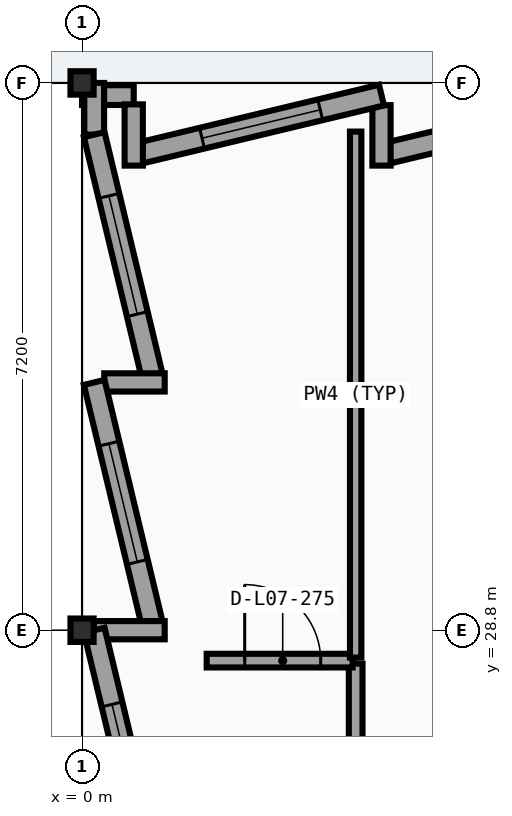
"""IFC4 building model, lengths in metres.
Left out: names, types, materials, properties, quantities, classifications, styles, units other than length and angle.
Written with IfcOpenShell. Run it as: python <this file> out.ifc"""

import sys

from ifc_helpers import new_model, si_unit, direction, frame, frame_2d, origin, origin_2d, place, context, subcontext, project, spatial, rectangle, i_section, extrude, element, fill, save


model = new_model("IFC4")
c1 = context("Model", 3, precision=1e-05, world=origin(), true_north=direction((0.0, 1.0)))
c2 = subcontext(c1, "Body", "Model", "MODEL_VIEW")
j1 = project(units=[si_unit("LENGTHUNIT", "METRE"), si_unit("PLANEANGLEUNIT", "RADIAN")], contexts=[c1])
p1 = place(None, origin())
s1 = spatial("IfcSite", under=j1, at=p1, CompositionType="ELEMENT")
p2 = place(p1, origin())
s2 = spatial("IfcBuilding", under=s1, at=p2, CompositionType="ELEMENT")
p3 = place(p2, frame((0.0, 0.0, 31.05)))
s3 = spatial("IfcBuildingStorey", under=s2, at=p3, CompositionType="ELEMENT", Elevation=31.05)
for number, where, z_axis, x_axis in (
    (1, (0.0, 28.8, 0.0), (0.0, 0.0, 1.0), (1.0, 0.0, 0.0)),
    (2, (0.0, 36.0, 0.0), (0.0, 0.0, 1.0), (1.0, 0.0, 0.0)),
):
    element("IfcColumn", number, at=place(p3, frame(where, z_axis=z_axis, x_axis=x_axis)), inside=s3, PredefinedType="COLUMN", context=c2, shape_type="SweptSolid", body=[
        extrude(i_section(OverallWidth=0.305, OverallDepth=0.308, WebThickness=0.01, FlangeThickness=0.015, FilletRadius=0.015, at=origin_2d()), origin(), (0.0, 0.0, 1.0), 4.2),
    ])
p4 = place(p3, frame((0.68, 35.84, 0.0), z_axis=(0.0, 0.0, 1.0), x_axis=(-1.0, 0.0, 0.0)))
e3 = element("IfcWall", 3, at=p4, inside=s3, PredefinedType="SOLIDWALL", context=c2, shape_type="SweptSolid", body=[
    extrude(rectangle(XDim=0.68, YDim=0.26, at=frame_2d((0.34, 0.0))), origin(), (0.0, 0.0, 1.0), 3.95),
])
p5 = place(p3, frame((7.2, 35.84, 0.0), z_axis=(0.0, 0.0, 1.0), x_axis=(-0.972366208453, -0.233460824675, 0.0)))
e4 = element("IfcWall", 4, at=p5, inside=s3, PredefinedType="SOLIDWALL", context=c2, shape_type="SweptSolid", body=[
    extrude(rectangle(XDim=3.258, YDim=0.28, at=frame_2d((1.629, 0.0))), origin(), (0.0, 0.0, 1.0), 3.95),
])
p6 = place(p5, frame((0.829, 0.0, 0.8)))
e5 = element("IfcOpeningElement", 5, at=p6, cuts=e4, PredefinedType="OPENING", context=c2, shape_type="SweptSolid", body=[
    extrude(rectangle(XDim=1.6, YDim=1.75, at=frame_2d((0.8, 0.875))), frame((0.0, 0.15, 0.0), z_axis=(0.0, -1.0, 0.0), x_axis=(1.0, 0.0, 0.0)), (0.0, 0.0, 1.0), 0.3),
])
p7 = place(p3, frame((3.94, 34.912, 0.0), z_axis=(0.0, 0.0, 1.0), x_axis=(0.0, 1.0, 0.0)))
e6 = element("IfcWall", 6, at=p7, inside=s3, PredefinedType="SOLIDWALL", context=c2, shape_type="SweptSolid", body=[
    extrude(rectangle(XDim=0.796, YDim=0.24, at=frame_2d((0.398, 0.0))), origin(), (0.0, 0.0, 1.0), 3.95),
])
p8 = place(p3, frame((3.94, 35.84, 0.0), z_axis=(0.0, 0.0, 1.0), x_axis=(-0.972366208453, -0.233460824675, 0.0)))
e7 = element("IfcWall", 7, at=p8, inside=s3, PredefinedType="SOLIDWALL", context=c2, shape_type="SweptSolid", body=[
    extrude(rectangle(XDim=3.258, YDim=0.28, at=frame_2d((1.629, 0.0))), origin(), (0.0, 0.0, 1.0), 3.95),
])
p9 = place(p8, frame((0.829, 0.0, 0.8)))
e8 = element("IfcOpeningElement", 8, at=p9, cuts=e7, PredefinedType="OPENING", context=c2, shape_type="SweptSolid", body=[
    extrude(rectangle(XDim=1.6, YDim=1.75, at=frame_2d((0.8, 0.875))), frame((0.0, 0.15, 0.0), z_axis=(0.0, -1.0, 0.0), x_axis=(1.0, 0.0, 0.0)), (0.0, 0.0, 1.0), 0.3),
])
p10 = place(p3, frame((0.68, 34.912, 0.0), z_axis=(0.0, 0.0, 1.0), x_axis=(0.0, 1.0, 0.0)))
e9 = element("IfcWall", 9, at=p10, inside=s3, PredefinedType="SOLIDWALL", context=c2, shape_type="SweptSolid", body=[
    extrude(rectangle(XDim=0.806, YDim=0.24, at=frame_2d((0.403, 0.0))), origin(), (0.0, 0.0, 1.0), 3.95),
])
p11 = place(p3, frame((0.16, 36.0, 0.0), z_axis=(0.0, 0.0, 1.0), x_axis=(0.0, -1.0, 0.0)))
e10 = element("IfcWall", 10, at=p11, inside=s3, PredefinedType="SOLIDWALL", context=c2, shape_type="SweptSolid", body=[
    extrude(rectangle(XDim=0.68, YDim=0.26, at=frame_2d((0.34, 0.0))), origin(), (0.0, 0.0, 1.0), 3.95),
])
p12 = place(p3, frame((0.16, 35.32, 0.0), z_axis=(0.0, 0.0, 1.0), x_axis=(0.233443812137, -0.972370292931, 0.0)))
e11 = element("IfcWall", 11, at=p12, inside=s3, PredefinedType="SOLIDWALL", context=c2, shape_type="SweptSolid", body=[
    extrude(rectangle(XDim=3.258, YDim=0.28, at=frame_2d((1.629, 0.0))), origin(), (0.0, 0.0, 1.0), 3.95),
])
p13 = place(p12, frame((0.829, 0.0, 0.8)))
e12 = element("IfcOpeningElement", 12, at=p13, cuts=e11, PredefinedType="OPENING", context=c2, shape_type="SweptSolid", body=[
    extrude(rectangle(XDim=1.6, YDim=1.75, at=frame_2d((0.8, 0.875))), frame((0.0, 0.15, 0.0), z_axis=(0.0, -1.0, 0.0), x_axis=(1.0, 0.0, 0.0)), (0.0, 0.0, 1.0), 0.3),
])
p14 = place(p3, frame((1.088, 32.06, 0.0), z_axis=(0.0, 0.0, 1.0), x_axis=(-1.0, 0.0, 0.0)))
e13 = element("IfcWall", 13, at=p14, inside=s3, PredefinedType="SOLIDWALL", context=c2, shape_type="SweptSolid", body=[
    extrude(rectangle(XDim=0.796, YDim=0.24, at=frame_2d((0.398, 0.0))), origin(), (0.0, 0.0, 1.0), 3.95),
])
p15 = place(p3, frame((0.16, 32.06, 0.0), z_axis=(0.0, 0.0, 1.0), x_axis=(0.233443812137, -0.972370292931, 0.0)))
e14 = element("IfcWall", 14, at=p15, inside=s3, PredefinedType="SOLIDWALL", context=c2, shape_type="SweptSolid", body=[
    extrude(rectangle(XDim=3.258, YDim=0.28, at=frame_2d((1.629, 0.0))), origin(), (0.0, 0.0, 1.0), 3.95),
])
p16 = place(p15, frame((0.829, 0.0, 0.8)))
e15 = element("IfcOpeningElement", 15, at=p16, cuts=e14, PredefinedType="OPENING", context=c2, shape_type="SweptSolid", body=[
    extrude(rectangle(XDim=1.6, YDim=1.75, at=frame_2d((0.8, 0.875))), frame((0.0, 0.15, 0.0), z_axis=(0.0, -1.0, 0.0), x_axis=(1.0, 0.0, 0.0)), (0.0, 0.0, 1.0), 0.3),
])
p17 = place(p3, frame((1.088, 28.8, 0.0), z_axis=(0.0, 0.0, 1.0), x_axis=(-1.0, 0.0, 0.0)))
e16 = element("IfcWall", 16, at=p17, inside=s3, PredefinedType="SOLIDWALL", context=c2, shape_type="SweptSolid", body=[
    extrude(rectangle(XDim=0.933, YDim=0.24, at=frame_2d((0.467, 0.0))), origin(), (0.0, 0.0, 1.0), 3.95),
])
p18 = place(p3, frame((0.16, 28.8, 0.0), z_axis=(0.0, 0.0, 1.0), x_axis=(0.233495818898, -0.972357805829, 0.0)))
e17 = element("IfcWall", 17, at=p18, inside=s3, PredefinedType="SOLIDWALL", context=c2, shape_type="SweptSolid", body=[
    extrude(rectangle(XDim=3.607, YDim=0.28, at=frame_2d((1.804, 0.0))), origin(), (0.0, 0.0, 1.0), 3.95),
])
p19 = place(p18, frame((1.004, 0.0, 0.8)))
e18 = element("IfcOpeningElement", 18, at=p19, cuts=e17, PredefinedType="OPENING", context=c2, shape_type="SweptSolid", body=[
    extrude(rectangle(XDim=1.6, YDim=1.75, at=frame_2d((0.8, 0.875))), frame((0.0, 0.15, 0.0), z_axis=(0.0, -1.0, 0.0), x_axis=(1.0, 0.0, 0.0)), (0.0, 0.0, 1.0), 0.3),
])
p20 = place(p3, frame((3.6, 24.44, 0.0), z_axis=(0.0, 0.0, 1.0), x_axis=(0.0, 1.0, 0.0)))
e19 = element("IfcWall", 19, at=p20, inside=s3, PredefinedType="PARTITIONING", context=c2, shape_type="SweptSolid", body=[
    extrude(rectangle(XDim=3.92, YDim=0.18, at=frame_2d((1.96, 0.0))), origin(), (0.0, 0.0, 1.0), 3.95),
])
p21 = place(p3, frame((1.64, 28.4, 0.0), z_axis=(0.0, 0.0, 1.0), x_axis=(1.0, 0.0, 0.0)))
e20 = element("IfcWall", 20, at=p21, inside=s3, PredefinedType="PARTITIONING", context=c2, shape_type="SweptSolid", body=[
    extrude(rectangle(XDim=1.92, YDim=0.18, at=frame_2d((0.96, 0.0))), origin(), (0.0, 0.0, 1.0), 3.95),
])
p22 = place(p21, frame((0.5, 0.0, 0.0)))
e21 = element("IfcOpeningElement", 21, at=p22, cuts=e20, PredefinedType="OPENING", context=c2, shape_type="SweptSolid", body=[
    extrude(rectangle(XDim=1.0, YDim=2.1, at=frame_2d((0.5, 1.05))), frame((0.0, 0.1, 0.0), z_axis=(0.0, -1.0, 0.0), x_axis=(1.0, 0.0, 0.0)), (0.0, 0.0, 1.0), 0.2),
])
p23 = place(p3, frame((3.6, 28.44, 0.0), z_axis=(0.0, 0.0, 1.0), x_axis=(0.0, 1.0, 0.0)))
e22 = element("IfcWall", 22, at=p23, inside=s3, PredefinedType="PARTITIONING", context=c2, shape_type="SweptSolid", body=[
    extrude(rectangle(XDim=6.92, YDim=0.15, at=frame_2d((3.46, 0.0))), origin(), (0.0, 0.0, 1.0), 3.95),
])
p24 = place(p9, origin())
e23 = element("IfcWindow", 23, at=p24, inside=s3, PartitioningType="SINGLE_PANEL", PredefinedType="WINDOW", context=c2, shape_type="SweptSolid", body=[
    extrude(rectangle(XDim=1.6, YDim=1.75, at=frame_2d((0.8, 0.875))), frame((0.0, 0.03, 0.0), z_axis=(0.0, -1.0, 0.0), x_axis=(1.0, 0.0, 0.0)), (0.0, 0.0, 1.0), 0.06),
])
fill(e8, e23)
p25 = place(p13, origin())
e24 = element("IfcWindow", 24, at=p25, inside=s3, PartitioningType="SINGLE_PANEL", PredefinedType="WINDOW", context=c2, shape_type="SweptSolid", body=[
    extrude(rectangle(XDim=1.6, YDim=1.75, at=frame_2d((0.8, 0.875))), frame((0.0, 0.03, 0.0), z_axis=(0.0, -1.0, 0.0), x_axis=(1.0, 0.0, 0.0)), (0.0, 0.0, 1.0), 0.06),
])
fill(e12, e24)
p26 = place(p16, origin())
e25 = element("IfcWindow", 25, at=p26, inside=s3, PartitioningType="SINGLE_PANEL", PredefinedType="WINDOW", context=c2, shape_type="SweptSolid", body=[
    extrude(rectangle(XDim=1.6, YDim=1.75, at=frame_2d((0.8, 0.875))), frame((0.0, 0.03, 0.0), z_axis=(0.0, -1.0, 0.0), x_axis=(1.0, 0.0, 0.0)), (0.0, 0.0, 1.0), 0.06),
])
fill(e15, e25)
p27 = place(p19, origin())
e26 = element("IfcWindow", 26, at=p27, inside=s3, PartitioningType="SINGLE_PANEL", PredefinedType="WINDOW", context=c2, shape_type="SweptSolid", body=[
    extrude(rectangle(XDim=1.6, YDim=1.75, at=frame_2d((0.8, 0.875))), frame((0.0, 0.03, 0.0), z_axis=(0.0, -1.0, 0.0), x_axis=(1.0, 0.0, 0.0)), (0.0, 0.0, 1.0), 0.06),
])
fill(e18, e26)
p28 = place(p22, origin())
e27 = element("IfcDoor", 27, at=p28, inside=s3, OperationType="SINGLE_SWING_LEFT", PredefinedType="DOOR", context=c2, shape_type="SweptSolid", body=[
    extrude(rectangle(XDim=1.0, YDim=2.1, at=frame_2d((0.5, 1.05))), frame((0.0, 0.025, 0.0), z_axis=(0.0, -1.0, 0.0), x_axis=(1.0, 0.0, 0.0)), (0.0, 0.0, 1.0), 0.05),
])
fill(e21, e27)
save(model, sys.argv[1])
